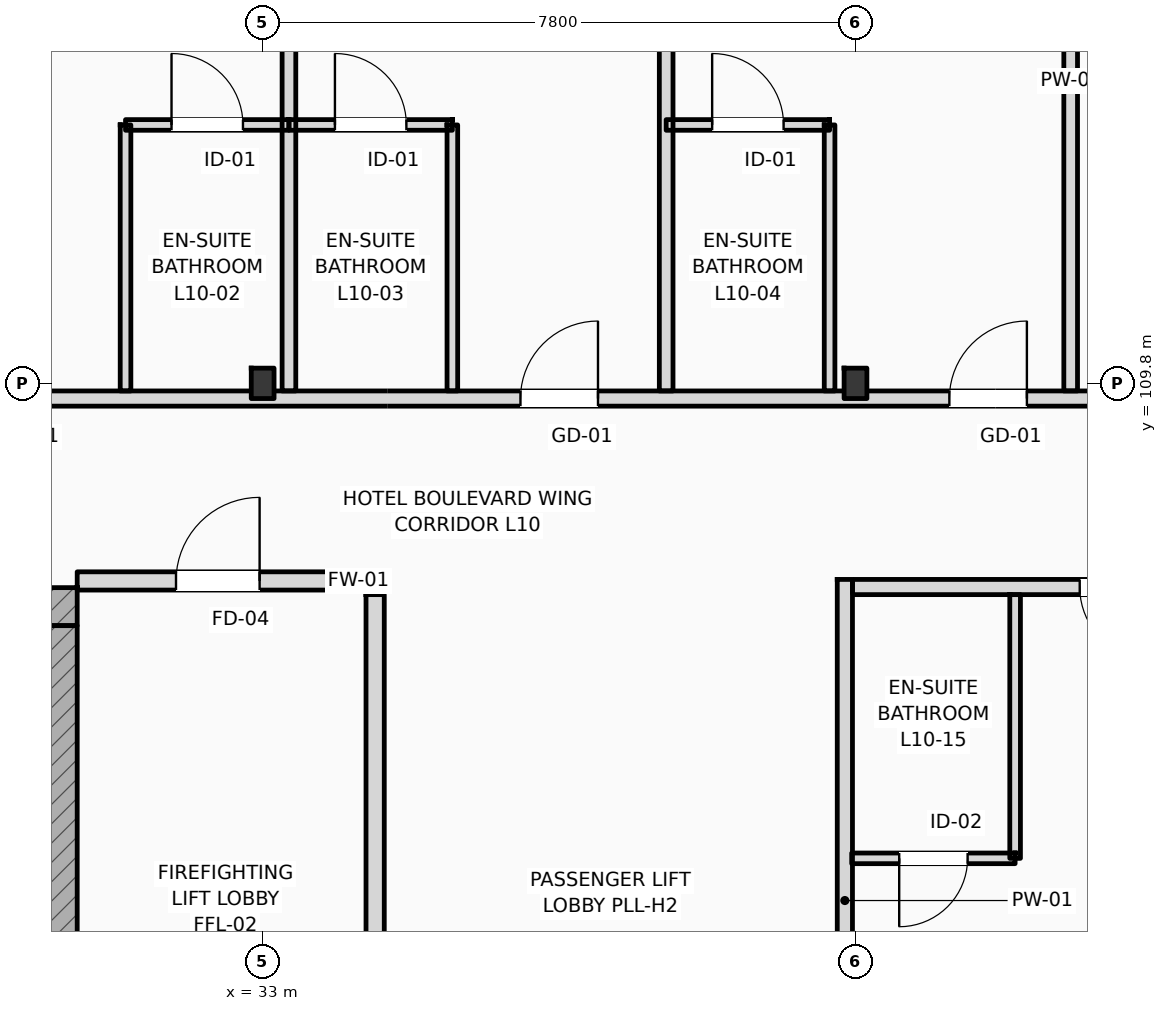
"""IFC4 building model, lengths in metres.
Left out: names, types, materials, properties, quantities, classifications, styles, units other than length and angle.
Written with IfcOpenShell. Run it as: python <this file> out.ifc"""

import sys

from ifc_helpers import new_model, si_unit, direction, frame, frame_2d, origin, origin_2d, place, context, subcontext, project, spatial, rectangle, i_section, extrude, element, fill, save


model = new_model("IFC4")
c1 = context("Model", 3, precision=1e-05, world=origin(), true_north=direction((0.0, 1.0)))
c2 = subcontext(c1, "Body", "Model", "MODEL_VIEW")
j1 = project(units=[si_unit("LENGTHUNIT", "METRE"), si_unit("PLANEANGLEUNIT", "RADIAN")], contexts=[c1])
p1 = place(None, origin())
s1 = spatial("IfcSite", under=j1, at=p1, CompositionType="ELEMENT")
p2 = place(p1, origin())
s2 = spatial("IfcBuilding", under=s1, at=p2, CompositionType="ELEMENT")
p3 = place(p2, frame((0.0, 0.0, 42.6)))
s3 = spatial("IfcBuildingStorey", under=s2, at=p3, CompositionType="ELEMENT", Elevation=42.6)
for number, where, z_axis, x_axis in (
    (1, (33.0, 109.8, 0.0), (0.0, 0.0, 1.0), (1.0, 0.0, 0.0)),
    (2, (40.8, 109.8, 0.0), (0.0, 0.0, 1.0), (1.0, 0.0, 0.0)),
):
    element("IfcColumn", number, at=place(p3, frame(where, z_axis=z_axis, x_axis=x_axis)), inside=s3, PredefinedType="COLUMN", context=c2, shape_type="SweptSolid", body=[
        extrude(i_section(OverallWidth=0.3, OverallDepth=0.4, WebThickness=0.013, FlangeThickness=0.024, FilletRadius=0.027, at=origin_2d()), origin(), (0.0, 0.0, 1.0), 4.2),
    ])
p4 = place(p3, frame((25.4, 106.862, 0.0), z_axis=(0.0, 0.0, 1.0), x_axis=(1.0, 0.0, 0.0)))
e3 = element("IfcWall", 3, at=p4, inside=s3, PredefinedType="SHEAR", context=c2, shape_type="SweptSolid", body=[
    extrude(rectangle(XDim=5.16, YDim=0.5, at=frame_2d((2.58, 0.0))), origin(), (0.0, 0.0, 1.0), 4.2),
])
p5 = place(p3, frame((30.31, 97.5, 0.0), z_axis=(0.0, 0.0, 1.0), x_axis=(0.0, 1.0, 0.0)))
e4 = element("IfcWall", 4, at=p5, inside=s3, PredefinedType="SHEAR", context=c2, shape_type="SweptSolid", body=[
    extrude(rectangle(XDim=9.112, YDim=0.5, at=frame_2d((4.556, 0.0))), origin(), (0.0, 0.0, 1.0), 4.2),
])
p6 = place(p5, frame((0.44, 0.0, 0.0)))
e5 = element("IfcOpeningElement", 5, at=p6, cuts=e4, PredefinedType="OPENING", context=c2, shape_type="SweptSolid", body=[
    extrude(rectangle(XDim=1.1, YDim=2.2, at=frame_2d((0.55, 1.1))), frame((0.0, 0.26, 0.0), z_axis=(0.0, -1.0, 0.0), x_axis=(1.0, 0.0, 0.0)), (0.0, 0.0, 1.0), 0.52),
])
p7 = place(p3, frame((34.48, 98.78, 0.0), z_axis=(0.0, 0.0, 1.0), x_axis=(0.0, 1.0, 0.0)))
e6 = element("IfcWall", 6, at=p7, inside=s3, PredefinedType="STANDARD", context=c2, shape_type="SweptSolid", body=[
    extrude(rectangle(XDim=8.24, YDim=0.24, at=frame_2d((4.12, 0.0))), origin(), (0.0, 0.0, 1.0), 3.94),
])
p8 = place(p3, frame((30.56, 107.2, 0.0), z_axis=(0.0, 0.0, 1.0), x_axis=(1.0, 0.0, 0.0)))
e7 = element("IfcWall", 7, at=p8, inside=s3, PredefinedType="STANDARD", context=c2, shape_type="SweptSolid", body=[
    extrude(rectangle(XDim=4.1, YDim=0.24, at=frame_2d((2.05, 0.0))), origin(), (0.0, 0.0, 1.0), 3.94),
])
p9 = place(p8, frame((1.3, 0.0, 0.0)))
e8 = element("IfcOpeningElement", 8, at=p9, cuts=e7, PredefinedType="OPENING", context=c2, shape_type="SweptSolid", body=[
    extrude(rectangle(XDim=1.1, YDim=2.2, at=frame_2d((0.55, 1.1))), frame((0.0, 0.13, 0.0), z_axis=(0.0, -1.0, 0.0), x_axis=(1.0, 0.0, 0.0)), (0.0, 0.0, 1.0), 0.26),
])
p10 = place(p3, frame((10.65, 109.6, 0.0), z_axis=(0.0, 0.0, 1.0), x_axis=(1.0, 0.0, 0.0)))
e9 = element("IfcWall", 9, at=p10, inside=s3, PredefinedType="PARTITIONING", context=c2, shape_type="SweptSolid", body=[
    extrude(rectangle(XDim=84.61, YDim=0.2, at=frame_2d((42.305, 0.0))), origin(), (0.0, 0.0, 1.0), 3.38),
])
p11 = place(p10, frame((15.926, 0.0, 0.0)))
e10 = element("IfcOpeningElement", 10, at=p11, cuts=e9, PredefinedType="OPENING", context=c2, shape_type="SweptSolid", body=[
    extrude(rectangle(XDim=1.02, YDim=2.2, at=frame_2d((0.51, 1.1))), frame((0.0, 0.11, 0.0), z_axis=(0.0, -1.0, 0.0), x_axis=(1.0, 0.0, 0.0)), (0.0, 0.0, 1.0), 0.22),
])
p12 = place(p10, frame((18.45, 0.0, 0.0)))
e11 = element("IfcOpeningElement", 11, at=p12, cuts=e9, PredefinedType="OPENING", context=c2, shape_type="SweptSolid", body=[
    extrude(rectangle(XDim=1.02, YDim=2.2, at=frame_2d((0.51, 1.1))), frame((0.0, 0.11, 0.0), z_axis=(0.0, -1.0, 0.0), x_axis=(1.0, 0.0, 0.0)), (0.0, 0.0, 1.0), 0.22),
])
p13 = place(p10, frame((25.742, 0.0, 0.0)))
e12 = element("IfcOpeningElement", 12, at=p13, cuts=e9, PredefinedType="OPENING", context=c2, shape_type="SweptSolid", body=[
    extrude(rectangle(XDim=1.02, YDim=2.2, at=frame_2d((0.51, 1.1))), frame((0.0, 0.11, 0.0), z_axis=(0.0, -1.0, 0.0), x_axis=(1.0, 0.0, 0.0)), (0.0, 0.0, 1.0), 0.22),
])
p14 = place(p10, frame((31.385, 0.0, 0.0)))
e13 = element("IfcOpeningElement", 13, at=p14, cuts=e9, PredefinedType="OPENING", context=c2, shape_type="SweptSolid", body=[
    extrude(rectangle(XDim=1.02, YDim=2.2, at=frame_2d((0.51, 1.1))), frame((0.0, 0.11, 0.0), z_axis=(0.0, -1.0, 0.0), x_axis=(1.0, 0.0, 0.0)), (0.0, 0.0, 1.0), 0.22),
])
p15 = place(p10, frame((33.908, 0.0, 0.0)))
e14 = element("IfcOpeningElement", 14, at=p15, cuts=e9, PredefinedType="OPENING", context=c2, shape_type="SweptSolid", body=[
    extrude(rectangle(XDim=0.96, YDim=2.2, at=frame_2d((0.48, 1.1))), frame((0.0, 0.11, 0.0), z_axis=(0.0, -1.0, 0.0), x_axis=(1.0, 0.0, 0.0)), (0.0, 0.0, 1.0), 0.22),
])
p16 = place(p10, frame((41.201, 0.0, 0.0)))
e15 = element("IfcOpeningElement", 15, at=p16, cuts=e9, PredefinedType="OPENING", context=c2, shape_type="SweptSolid", body=[
    extrude(rectangle(XDim=0.96, YDim=2.2, at=frame_2d((0.48, 1.1))), frame((0.0, 0.11, 0.0), z_axis=(0.0, -1.0, 0.0), x_axis=(1.0, 0.0, 0.0)), (0.0, 0.0, 1.0), 0.22),
])
p17 = place(p10, frame((46.844, 0.0, 0.0)))
e16 = element("IfcOpeningElement", 16, at=p17, cuts=e9, PredefinedType="OPENING", context=c2, shape_type="SweptSolid", body=[
    extrude(rectangle(XDim=0.96, YDim=2.2, at=frame_2d((0.48, 1.1))), frame((0.0, 0.11, 0.0), z_axis=(0.0, -1.0, 0.0), x_axis=(1.0, 0.0, 0.0)), (0.0, 0.0, 1.0), 0.22),
])
p18 = place(p10, frame((49.337, 0.0, 0.0)))
e17 = element("IfcOpeningElement", 17, at=p18, cuts=e9, PredefinedType="OPENING", context=c2, shape_type="SweptSolid", body=[
    extrude(rectangle(XDim=0.96, YDim=2.2, at=frame_2d((0.48, 1.1))), frame((0.0, 0.11, 0.0), z_axis=(0.0, -1.0, 0.0), x_axis=(1.0, 0.0, 0.0)), (0.0, 0.0, 1.0), 0.22),
])
p19 = place(p10, frame((56.63, 0.0, 0.0)))
e18 = element("IfcOpeningElement", 18, at=p19, cuts=e9, PredefinedType="OPENING", context=c2, shape_type="SweptSolid", body=[
    extrude(rectangle(XDim=0.96, YDim=2.2, at=frame_2d((0.48, 1.1))), frame((0.0, 0.11, 0.0), z_axis=(0.0, -1.0, 0.0), x_axis=(1.0, 0.0, 0.0)), (0.0, 0.0, 1.0), 0.22),
])
p20 = place(p10, frame((62.523, 0.0, 0.0)))
e19 = element("IfcOpeningElement", 19, at=p20, cuts=e9, PredefinedType="OPENING", context=c2, shape_type="SweptSolid", body=[
    extrude(rectangle(XDim=0.96, YDim=2.2, at=frame_2d((0.48, 1.1))), frame((0.0, 0.11, 0.0), z_axis=(0.0, -1.0, 0.0), x_axis=(1.0, 0.0, 0.0)), (0.0, 0.0, 1.0), 0.22),
])
p21 = place(p10, frame((64.765, 0.0, 0.0)))
e20 = element("IfcOpeningElement", 20, at=p21, cuts=e9, PredefinedType="OPENING", context=c2, shape_type="SweptSolid", body=[
    extrude(rectangle(XDim=0.96, YDim=2.2, at=frame_2d((0.48, 1.1))), frame((0.0, 0.11, 0.0), z_axis=(0.0, -1.0, 0.0), x_axis=(1.0, 0.0, 0.0)), (0.0, 0.0, 1.0), 0.22),
])
p22 = place(p10, frame((72.057, 0.0, 0.0)))
e21 = element("IfcOpeningElement", 21, at=p22, cuts=e9, PredefinedType="OPENING", context=c2, shape_type="SweptSolid", body=[
    extrude(rectangle(XDim=0.96, YDim=2.2, at=frame_2d((0.48, 1.1))), frame((0.0, 0.11, 0.0), z_axis=(0.0, -1.0, 0.0), x_axis=(1.0, 0.0, 0.0)), (0.0, 0.0, 1.0), 0.22),
])
p23 = place(p10, frame((74.55, 0.0, 0.0)))
e22 = element("IfcOpeningElement", 22, at=p23, cuts=e9, PredefinedType="OPENING", context=c2, shape_type="SweptSolid", body=[
    extrude(rectangle(XDim=0.96, YDim=2.2, at=frame_2d((0.48, 1.1))), frame((0.0, 0.11, 0.0), z_axis=(0.0, -1.0, 0.0), x_axis=(1.0, 0.0, 0.0)), (0.0, 0.0, 1.0), 0.22),
])
p24 = place(p10, frame((80.163, 0.0, 0.0)))
e23 = element("IfcOpeningElement", 23, at=p24, cuts=e9, PredefinedType="OPENING", context=c2, shape_type="SweptSolid", body=[
    extrude(rectangle(XDim=0.96, YDim=2.2, at=frame_2d((0.48, 1.1))), frame((0.0, 0.11, 0.0), z_axis=(0.0, -1.0, 0.0), x_axis=(1.0, 0.0, 0.0)), (0.0, 0.0, 1.0), 0.22),
])
p25 = place(p10, frame((2.716, 0.0, 0.0)))
e24 = element("IfcOpeningElement", 24, at=p25, cuts=e9, PredefinedType="OPENING", context=c2, shape_type="SweptSolid", body=[
    extrude(rectangle(XDim=1.35, YDim=2.25, at=frame_2d((0.675, 1.125))), frame((0.0, 0.11, 0.0), z_axis=(0.0, -1.0, 0.0), x_axis=(1.0, 0.0, 0.0)), (0.0, 0.0, 1.0), 0.22),
])
p26 = place(p10, frame((6.65, 0.0, 0.0)))
e25 = element("IfcOpeningElement", 25, at=p26, cuts=e9, PredefinedType="OPENING", context=c2, shape_type="SweptSolid", body=[
    extrude(rectangle(XDim=1.35, YDim=2.25, at=frame_2d((0.675, 1.125))), frame((0.0, 0.11, 0.0), z_axis=(0.0, -1.0, 0.0), x_axis=(1.0, 0.0, 0.0)), (0.0, 0.0, 1.0), 0.22),
])
p27 = place(p10, frame((10.583, 0.0, 0.0)))
e26 = element("IfcOpeningElement", 26, at=p27, cuts=e9, PredefinedType="OPENING", context=c2, shape_type="SweptSolid", body=[
    extrude(rectangle(XDim=1.35, YDim=2.25, at=frame_2d((0.675, 1.125))), frame((0.0, 0.11, 0.0), z_axis=(0.0, -1.0, 0.0), x_axis=(1.0, 0.0, 0.0)), (0.0, 0.0, 1.0), 0.22),
])
p28 = place(p3, frame((40.76, 107.12, 0.0), z_axis=(0.0, 0.0, 1.0), x_axis=(1.0, 0.0, 0.0)))
e27 = element("IfcWall", 27, at=p28, inside=s3, PredefinedType="PARTITIONING", context=c2, shape_type="SweptSolid", body=[
    extrude(rectangle(XDim=23.44, YDim=0.2, at=frame_2d((11.72, 0.0))), origin(), (0.0, 0.0, 1.0), 3.94),
])
p29 = place(p28, frame((2.99, 0.0, 0.0)))
e28 = element("IfcOpeningElement", 28, at=p29, cuts=e27, PredefinedType="OPENING", context=c2, shape_type="SweptSolid", body=[
    extrude(rectangle(XDim=0.96, YDim=2.2, at=frame_2d((0.48, 1.1))), frame((0.0, 0.11, 0.0), z_axis=(0.0, -1.0, 0.0), x_axis=(1.0, 0.0, 0.0)), (0.0, 0.0, 1.0), 0.22),
])
p30 = place(p28, frame((5.5, 0.0, 0.0)))
e29 = element("IfcOpeningElement", 29, at=p30, cuts=e27, PredefinedType="OPENING", context=c2, shape_type="SweptSolid", body=[
    extrude(rectangle(XDim=0.96, YDim=2.2, at=frame_2d((0.48, 1.1))), frame((0.0, 0.11, 0.0), z_axis=(0.0, -1.0, 0.0), x_axis=(1.0, 0.0, 0.0)), (0.0, 0.0, 1.0), 0.22),
])
p31 = place(p28, frame((12.34, 0.0, 0.0)))
e30 = element("IfcOpeningElement", 30, at=p31, cuts=e27, PredefinedType="OPENING", context=c2, shape_type="SweptSolid", body=[
    extrude(rectangle(XDim=0.96, YDim=2.2, at=frame_2d((0.48, 1.1))), frame((0.0, 0.11, 0.0), z_axis=(0.0, -1.0, 0.0), x_axis=(1.0, 0.0, 0.0)), (0.0, 0.0, 1.0), 0.22),
])
p32 = place(p28, frame((17.03, 0.0, 0.0)))
e31 = element("IfcOpeningElement", 31, at=p32, cuts=e27, PredefinedType="OPENING", context=c2, shape_type="SweptSolid", body=[
    extrude(rectangle(XDim=0.96, YDim=2.2, at=frame_2d((0.48, 1.1))), frame((0.0, 0.11, 0.0), z_axis=(0.0, -1.0, 0.0), x_axis=(1.0, 0.0, 0.0)), (0.0, 0.0, 1.0), 0.22),
])
p33 = place(p28, frame((19.51, 0.0, 0.0)))
e32 = element("IfcOpeningElement", 32, at=p33, cuts=e27, PredefinedType="OPENING", context=c2, shape_type="SweptSolid", body=[
    extrude(rectangle(XDim=0.96, YDim=2.2, at=frame_2d((0.48, 1.1))), frame((0.0, 0.11, 0.0), z_axis=(0.0, -1.0, 0.0), x_axis=(1.0, 0.0, 0.0)), (0.0, 0.0, 1.0), 0.22),
])
p34 = place(p3, frame((40.66, 98.77, 0.0), z_axis=(0.0, 0.0, 1.0), x_axis=(0.0, 1.0, 0.0)))
e33 = element("IfcWall", 33, at=p34, inside=s3, PredefinedType="PARTITIONING", context=c2, shape_type="SweptSolid", body=[
    extrude(rectangle(XDim=8.45, YDim=0.2, at=frame_2d((4.225, 0.0))), origin(), (0.0, 0.0, 1.0), 3.57),
])
p35 = place(p3, frame((33.346, 109.7, 0.0), z_axis=(0.0, 0.0, 1.0), x_axis=(0.0, 1.0, 0.0)))
e34 = element("IfcWall", 34, at=p35, inside=s3, PredefinedType="PARTITIONING", context=c2, shape_type="SweptSolid", body=[
    extrude(rectangle(XDim=8.15, YDim=0.18, at=frame_2d((4.075, 0.0))), origin(), (0.0, 0.0, 1.0), 3.94),
])
p36 = place(p3, frame((31.196, 109.7, 0.0), z_axis=(0.0, 0.0, 1.0), x_axis=(0.0, 1.0, 0.0)))
e35 = element("IfcWall", 35, at=p36, inside=s3, PredefinedType="PARTITIONING", context=c2, shape_type="SweptSolid", body=[
    extrude(rectangle(XDim=3.5, YDim=0.14, at=frame_2d((1.75, 0.0))), origin(), (0.0, 0.0, 1.0), 3.94),
])
p37 = place(p3, frame((31.196, 113.2, 0.0), z_axis=(0.0, 0.0, 1.0), x_axis=(1.0, 0.0, 0.0)))
e36 = element("IfcWall", 36, at=p37, inside=s3, PredefinedType="PARTITIONING", context=c2, shape_type="SweptSolid", body=[
    extrude(rectangle(XDim=2.15, YDim=0.14, at=frame_2d((1.075, 0.0))), origin(), (0.0, 0.0, 1.0), 3.94),
])
p38 = place(p37, frame((0.605, 0.0, 0.0)))
e37 = element("IfcOpeningElement", 37, at=p38, cuts=e36, PredefinedType="OPENING", context=c2, shape_type="SweptSolid", body=[
    extrude(rectangle(XDim=0.94, YDim=2.15, at=frame_2d((0.47, 1.075))), frame((0.0, 0.08, 0.0), z_axis=(0.0, -1.0, 0.0), x_axis=(1.0, 0.0, 0.0)), (0.0, 0.0, 1.0), 0.16),
])
p39 = place(p3, frame((38.309, 109.7, 0.0), z_axis=(0.0, 0.0, 1.0), x_axis=(0.0, 1.0, 0.0)))
e38 = element("IfcWall", 38, at=p39, inside=s3, PredefinedType="PARTITIONING", context=c2, shape_type="SweptSolid", body=[
    extrude(rectangle(XDim=8.15, YDim=0.18, at=frame_2d((4.075, 0.0))), origin(), (0.0, 0.0, 1.0), 3.63),
])
p40 = place(p3, frame((35.496, 109.7, 0.0), z_axis=(0.0, 0.0, 1.0), x_axis=(0.0, 1.0, 0.0)))
e39 = element("IfcWall", 39, at=p40, inside=s3, PredefinedType="PARTITIONING", context=c2, shape_type="SweptSolid", body=[
    extrude(rectangle(XDim=3.5, YDim=0.14, at=frame_2d((1.75, 0.0))), origin(), (0.0, 0.0, 1.0), 3.63),
])
p41 = place(p3, frame((33.346, 113.2, 0.0), z_axis=(0.0, 0.0, 1.0), x_axis=(1.0, 0.0, 0.0)))
e40 = element("IfcWall", 40, at=p41, inside=s3, PredefinedType="PARTITIONING", context=c2, shape_type="SweptSolid", body=[
    extrude(rectangle(XDim=2.15, YDim=0.14, at=frame_2d((1.075, 0.0))), origin(), (0.0, 0.0, 1.0), 3.94),
])
p42 = place(p41, frame((0.605, 0.0, 0.0)))
e41 = element("IfcOpeningElement", 41, at=p42, cuts=e40, PredefinedType="OPENING", context=c2, shape_type="SweptSolid", body=[
    extrude(rectangle(XDim=0.94, YDim=2.15, at=frame_2d((0.47, 1.075))), frame((0.0, 0.08, 0.0), z_axis=(0.0, -1.0, 0.0), x_axis=(1.0, 0.0, 0.0)), (0.0, 0.0, 1.0), 0.16),
])
p43 = place(p3, frame((43.631, 109.7, 0.0), z_axis=(0.0, 0.0, 1.0), x_axis=(0.0, 1.0, 0.0)))
e42 = element("IfcWall", 42, at=p43, inside=s3, PredefinedType="PARTITIONING", context=c2, shape_type="SweptSolid", body=[
    extrude(rectangle(XDim=8.15, YDim=0.18, at=frame_2d((4.075, 0.0))), origin(), (0.0, 0.0, 1.0), 3.63),
])
p44 = place(p3, frame((40.459, 109.7, 0.0), z_axis=(0.0, 0.0, 1.0), x_axis=(0.0, 1.0, 0.0)))
e43 = element("IfcWall", 43, at=p44, inside=s3, PredefinedType="PARTITIONING", context=c2, shape_type="SweptSolid", body=[
    extrude(rectangle(XDim=3.5, YDim=0.14, at=frame_2d((1.75, 0.0))), origin(), (0.0, 0.0, 1.0), 3.94),
])
p45 = place(p3, frame((38.309, 113.2, 0.0), z_axis=(0.0, 0.0, 1.0), x_axis=(1.0, 0.0, 0.0)))
e44 = element("IfcWall", 44, at=p45, inside=s3, PredefinedType="PARTITIONING", context=c2, shape_type="SweptSolid", body=[
    extrude(rectangle(XDim=2.15, YDim=0.14, at=frame_2d((1.075, 0.0))), origin(), (0.0, 0.0, 1.0), 3.94),
])
p46 = place(p45, frame((0.605, 0.0, 0.0)))
e45 = element("IfcOpeningElement", 45, at=p46, cuts=e44, PredefinedType="OPENING", context=c2, shape_type="SweptSolid", body=[
    extrude(rectangle(XDim=0.94, YDim=2.15, at=frame_2d((0.47, 1.075))), frame((0.0, 0.08, 0.0), z_axis=(0.0, -1.0, 0.0), x_axis=(1.0, 0.0, 0.0)), (0.0, 0.0, 1.0), 0.16),
])
p47 = place(p3, frame((42.9, 103.55, 0.0), z_axis=(0.0, 0.0, 1.0), x_axis=(0.0, 1.0, 0.0)))
e46 = element("IfcWall", 46, at=p47, inside=s3, PredefinedType="PARTITIONING", context=c2, shape_type="SweptSolid", body=[
    extrude(rectangle(XDim=3.47, YDim=0.14, at=frame_2d((1.735, 0.0))), origin(), (0.0, 0.0, 1.0), 3.94),
])
p48 = place(p3, frame((40.75, 103.55, 0.0), z_axis=(0.0, 0.0, 1.0), x_axis=(1.0, 0.0, 0.0)))
e47 = element("IfcWall", 47, at=p48, inside=s3, PredefinedType="PARTITIONING", context=c2, shape_type="SweptSolid", body=[
    extrude(rectangle(XDim=2.15, YDim=0.14, at=frame_2d((1.075, 0.0))), origin(), (0.0, 0.0, 1.0), 3.94),
])
p49 = place(p48, frame((0.625, 0.0, 0.0)))
e48 = element("IfcOpeningElement", 48, at=p49, cuts=e47, PredefinedType="OPENING", context=c2, shape_type="SweptSolid", body=[
    extrude(rectangle(XDim=0.9, YDim=2.1, at=frame_2d((0.45, 1.05))), frame((0.0, 0.08, 0.0), z_axis=(0.0, -1.0, 0.0), x_axis=(1.0, 0.0, 0.0)), (0.0, 0.0, 1.0), 0.16),
])
p50 = place(p9, origin())
e49 = element("IfcDoor", 49, at=p50, inside=s3, OperationType="SINGLE_SWING_RIGHT", PredefinedType="DOOR", context=c2, shape_type="SweptSolid", body=[
    extrude(rectangle(XDim=1.1, YDim=2.2, at=frame_2d((0.55, 1.1))), frame((0.0, 0.025, 0.0), z_axis=(0.0, -1.0, 0.0), x_axis=(1.0, 0.0, 0.0)), (0.0, 0.0, 1.0), 0.05),
])
fill(e8, e49)
p51 = place(p38, origin())
e50 = element("IfcDoor", 50, at=p51, inside=s3, OperationType="SINGLE_SWING_LEFT", PredefinedType="DOOR", context=c2, shape_type="SweptSolid", body=[
    extrude(rectangle(XDim=0.94, YDim=2.15, at=frame_2d((0.47, 1.075))), frame((0.0, 0.025, 0.0), z_axis=(0.0, -1.0, 0.0), x_axis=(1.0, 0.0, 0.0)), (0.0, 0.0, 1.0), 0.05),
])
fill(e37, e50)
p52 = place(p13, origin())
e51 = element("IfcDoor", 51, at=p52, inside=s3, OperationType="SINGLE_SWING_RIGHT", PredefinedType="DOOR", context=c2, shape_type="SweptSolid", body=[
    extrude(rectangle(XDim=1.02, YDim=2.2, at=frame_2d((0.51, 1.1))), frame((0.0, 0.025, 0.0), z_axis=(0.0, -1.0, 0.0), x_axis=(1.0, 0.0, 0.0)), (0.0, 0.0, 1.0), 0.05),
])
fill(e12, e51)
p53 = place(p42, origin())
e52 = element("IfcDoor", 52, at=p53, inside=s3, OperationType="SINGLE_SWING_LEFT", PredefinedType="DOOR", context=c2, shape_type="SweptSolid", body=[
    extrude(rectangle(XDim=0.94, YDim=2.15, at=frame_2d((0.47, 1.075))), frame((0.0, 0.025, 0.0), z_axis=(0.0, -1.0, 0.0), x_axis=(1.0, 0.0, 0.0)), (0.0, 0.0, 1.0), 0.05),
])
fill(e41, e52)
p54 = place(p14, origin())
e53 = element("IfcDoor", 53, at=p54, inside=s3, OperationType="SINGLE_SWING_RIGHT", PredefinedType="DOOR", context=c2, shape_type="SweptSolid", body=[
    extrude(rectangle(XDim=1.02, YDim=2.2, at=frame_2d((0.51, 1.1))), frame((0.0, 0.025, 0.0), z_axis=(0.0, -1.0, 0.0), x_axis=(1.0, 0.0, 0.0)), (0.0, 0.0, 1.0), 0.05),
])
fill(e13, e53)
p55 = place(p46, origin())
e54 = element("IfcDoor", 54, at=p55, inside=s3, OperationType="SINGLE_SWING_LEFT", PredefinedType="DOOR", context=c2, shape_type="SweptSolid", body=[
    extrude(rectangle(XDim=0.94, YDim=2.15, at=frame_2d((0.47, 1.075))), frame((0.0, 0.025, 0.0), z_axis=(0.0, -1.0, 0.0), x_axis=(1.0, 0.0, 0.0)), (0.0, 0.0, 1.0), 0.05),
])
fill(e45, e54)
p56 = place(p29, frame((0.96, 0.0, 0.0), z_axis=(0.0, 0.0, 1.0), x_axis=(-1.0, 0.0, 0.0)))
e55 = element("IfcDoor", 55, at=p56, inside=s3, OperationType="SINGLE_SWING_RIGHT", PredefinedType="DOOR", context=c2, shape_type="SweptSolid", body=[
    extrude(rectangle(XDim=0.96, YDim=2.2, at=frame_2d((0.48, 1.1))), frame((0.0, 0.025, 0.0), z_axis=(0.0, -1.0, 0.0), x_axis=(1.0, 0.0, 0.0)), (0.0, 0.0, 1.0), 0.05),
])
fill(e28, e55)
p57 = place(p49, frame((0.9, 0.0, 0.0), z_axis=(0.0, 0.0, 1.0), x_axis=(-1.0, 0.0, 0.0)))
e56 = element("IfcDoor", 56, at=p57, inside=s3, OperationType="SINGLE_SWING_LEFT", PredefinedType="DOOR", context=c2, shape_type="SweptSolid", body=[
    extrude(rectangle(XDim=0.9, YDim=2.1, at=frame_2d((0.45, 1.05))), frame((0.0, 0.025, 0.0), z_axis=(0.0, -1.0, 0.0), x_axis=(1.0, 0.0, 0.0)), (0.0, 0.0, 1.0), 0.05),
])
fill(e48, e56)
save(model, sys.argv[1])
